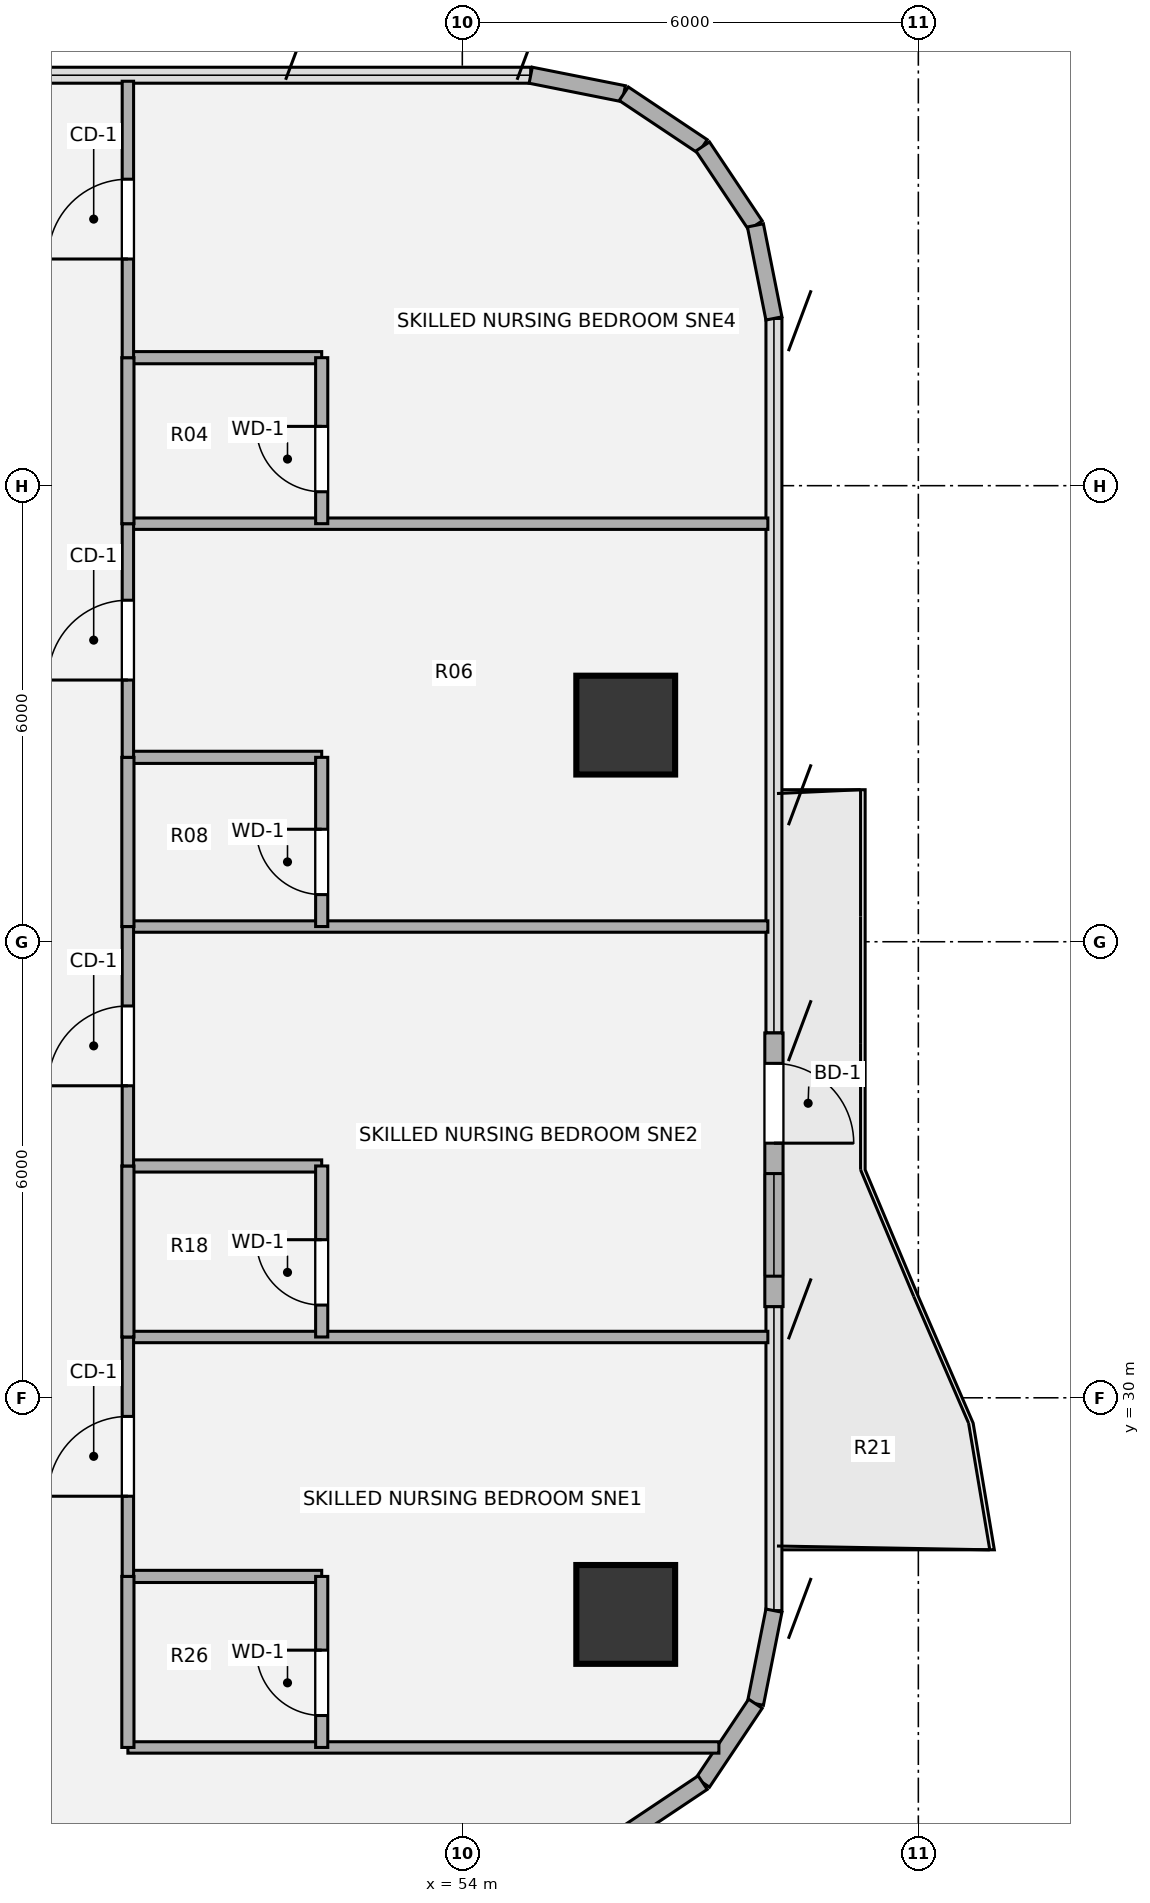
"""IFC4 building model, lengths in metres.
Left out: names, types, materials, properties, quantities, classifications, styles, units other than length and angle.
Written with IfcOpenShell. Run it as: python <this file> out.ifc"""

import sys

from ifc_helpers import new_model, si_unit, direction, frame, frame_2d, origin, origin_2d, place, context, subcontext, project, spatial, rectangle, hollow_circle, extrude, source, transform, mapped, element, fill, save


model = new_model("IFC4")
c1 = context("Model", 3, precision=1e-05, world=origin(), true_north=direction((0.0, 1.0)))
c2 = subcontext(c1, "Body", "Model", "MODEL_VIEW")
j1 = project(units=[si_unit("LENGTHUNIT", "METRE"), si_unit("PLANEANGLEUNIT", "RADIAN")], contexts=[c1])
p1 = place(None, origin())
s1 = spatial("IfcSite", under=j1, at=p1, CompositionType="ELEMENT")
p2 = place(p1, origin())
s2 = spatial("IfcBuilding", under=s1, at=p2, CompositionType="ELEMENT")
p3 = place(p2, frame((0.0, 0.0, 135.18)))
s3 = spatial("IfcBuildingStorey", under=s2, at=p3, CompositionType="ELEMENT", Elevation=135.18)
m1 = source(origin(), c2, "Body", "SweptSolid", [
    extrude(hollow_circle(Radius=0.65, WallThickness=0.045, at=origin_2d()), origin(), (0.0, 0.0, 1.0), 3.78),
])
for number, where, z_axis, x_axis in (
    (1, (56.15, 27.15, 0.0), (0.0, 0.0, 1.0), (1.0, 0.0, 0.0)),
    (2, (56.15, 38.85, 0.0), (0.0, 0.0, 1.0), (1.0, 0.0, 0.0)),
):
    element("IfcColumn", number, at=place(p3, frame(where, z_axis=z_axis, x_axis=x_axis)), inside=s3, PredefinedType="COLUMN", context=c2, shape_type="MappedRepresentation", body=[
        mapped(m1, transform((0.0, 0.0, 0.0), x_axis=(1.0, 0.0, 0.0), y_axis=(0.0, 1.0, 0.0), z_axis=(0.0, 0.0, 1.0), scale=1.0)),
    ])
for number, where, z_axis, x_axis in (
    (3, (54.9, 47.4, 0.0), (0.0, 0.0, 1.0), (0.981, -0.195, 0.0)),
    (4, (56.125, 47.156, 0.0), (0.0, 0.0, 1.0), (0.831, -0.556, 0.0)),
    (5, (57.163, 46.463, 0.0), (0.0, 0.0, 1.0), (0.556, -0.831, 0.0)),
    (6, (57.856, 45.425, 0.0), (0.0, 0.0, 1.0), (0.195, -0.981, 0.0)),
):
    element("IfcWall", number, at=place(p3, frame(where, z_axis=z_axis, x_axis=x_axis)), inside=s3, PredefinedType="SOLIDWALL", context=c2, shape_type="SweptSolid", body=[
        extrude(rectangle(XDim=1.249, YDim=0.215, at=frame_2d((0.624, 0.0))), origin(), (0.0, 0.0, 1.0), 3.53),
    ])
p4 = place(p3, frame((58.1, 34.8, 0.0), z_axis=(0.0, 0.0, 1.0), x_axis=(0.0, -1.0, 0.0)))
e7 = element("IfcWall", 7, at=p4, inside=s3, PredefinedType="SOLIDWALL", context=c2, shape_type="SweptSolid", body=[
    extrude(rectangle(XDim=3.6, YDim=0.24, at=frame_2d((1.8, 0.0))), origin(), (0.0, 0.0, 1.0), 3.53),
])
p5 = place(p4, frame((0.4, 0.0, 0.0)))
e8 = element("IfcOpeningElement", 8, at=p5, cuts=e7, PredefinedType="OPENING", context=c2, shape_type="SweptSolid", body=[
    extrude(rectangle(XDim=1.05, YDim=2.15, at=origin_2d()), frame((0.525, 0.13, 1.075), z_axis=(0.0, -1.0, 0.0), x_axis=(1.0, 0.0, 0.0)), (0.0, 0.0, 1.0), 0.26),
])
p6 = place(p4, frame((1.85, 0.0, 0.85)))
e9 = element("IfcOpeningElement", 9, at=p6, cuts=e7, PredefinedType="OPENING", context=c2, shape_type="SweptSolid", body=[
    extrude(rectangle(XDim=1.35, YDim=1.35, at=origin_2d()), frame((0.675, 0.13, 0.675), z_axis=(0.0, -1.0, 0.0), x_axis=(1.0, 0.0, 0.0)), (0.0, 0.0, 1.0), 0.26),
])
for number, where, z_axis, x_axis in (
    (10, (58.1, 27.2, 0.0), (0.0, 0.0, 1.0), (-0.195, -0.981, 0.0)),
    (11, (57.856, 25.975, 0.0), (0.0, 0.0, 1.0), (-0.556, -0.831, 0.0)),
    (12, (57.163, 24.937, 0.0), (0.0, 0.0, 1.0), (-0.831, -0.556, 0.0)),
):
    element("IfcWall", number, at=place(p3, frame(where, z_axis=z_axis, x_axis=x_axis)), inside=s3, PredefinedType="SOLIDWALL", context=c2, shape_type="SweptSolid", body=[
        extrude(rectangle(XDim=1.249, YDim=0.215, at=frame_2d((0.624, 0.0))), origin(), (0.0, 0.0, 1.0), 3.53),
    ])
p7 = place(p3, frame((49.6, 25.4, 0.0), z_axis=(0.0, 0.0, 1.0), x_axis=(1.0, 0.0, 0.0)))
e13 = element("IfcWall", 13, at=p7, inside=s3, PredefinedType="PARTITIONING", context=c2, shape_type="SweptSolid", body=[
    extrude(rectangle(XDim=7.776, YDim=0.15, at=frame_2d((3.888, 0.0))), origin(), (0.0, 0.0, 1.0), 3.5),
])
p8 = place(p3, frame((49.6, 27.65, 0.0), z_axis=(0.0, 0.0, 1.0), x_axis=(1.0, 0.0, 0.0)))
e14 = element("IfcWall", 14, at=p8, inside=s3, PredefinedType="PLUMBINGWALL", context=c2, shape_type="SweptSolid", body=[
    extrude(rectangle(XDim=2.55, YDim=0.16, at=frame_2d((1.275, 0.0))), origin(), (0.0, 0.0, 1.0), 2.982),
])
p9 = place(p3, frame((49.6, 30.8, 0.0), z_axis=(0.0, 0.0, 1.0), x_axis=(1.0, 0.0, 0.0)))
e15 = element("IfcWall", 15, at=p9, inside=s3, PredefinedType="PARTITIONING", context=c2, shape_type="SweptSolid", body=[
    extrude(rectangle(XDim=8.42, YDim=0.15, at=frame_2d((4.21, 0.0))), origin(), (0.0, 0.0, 1.0), 2.982),
])
p10 = place(p3, frame((49.6, 33.05, 0.0), z_axis=(0.0, 0.0, 1.0), x_axis=(1.0, 0.0, 0.0)))
e16 = element("IfcWall", 16, at=p10, inside=s3, PredefinedType="PLUMBINGWALL", context=c2, shape_type="SweptSolid", body=[
    extrude(rectangle(XDim=2.55, YDim=0.16, at=frame_2d((1.275, 0.0))), origin(), (0.0, 0.0, 1.0), 2.982),
])
p11 = place(p3, frame((49.6, 36.2, 0.0), z_axis=(0.0, 0.0, 1.0), x_axis=(1.0, 0.0, 0.0)))
e17 = element("IfcWall", 17, at=p11, inside=s3, PredefinedType="PARTITIONING", context=c2, shape_type="SweptSolid", body=[
    extrude(rectangle(XDim=8.42, YDim=0.15, at=frame_2d((4.21, 0.0))), origin(), (0.0, 0.0, 1.0), 2.982),
])
p12 = place(p3, frame((49.6, 38.426, 0.0), z_axis=(0.0, 0.0, 1.0), x_axis=(1.0, 0.0, 0.0)))
e18 = element("IfcWall", 18, at=p12, inside=s3, PredefinedType="PLUMBINGWALL", context=c2, shape_type="SweptSolid", body=[
    extrude(rectangle(XDim=2.55, YDim=0.16, at=frame_2d((1.275, 0.0))), origin(), (0.0, 0.0, 1.0), 3.055),
])
p13 = place(p3, frame((49.6, 41.5, 0.0), z_axis=(0.0, 0.0, 1.0), x_axis=(1.0, 0.0, 0.0)))
e19 = element("IfcWall", 19, at=p13, inside=s3, PredefinedType="PARTITIONING", context=c2, shape_type="SweptSolid", body=[
    extrude(rectangle(XDim=8.42, YDim=0.15, at=frame_2d((4.21, 0.0))), origin(), (0.0, 0.0, 1.0), 3.5),
])
p14 = place(p3, frame((49.6, 43.684, 0.0), z_axis=(0.0, 0.0, 1.0), x_axis=(1.0, 0.0, 0.0)))
e20 = element("IfcWall", 20, at=p14, inside=s3, PredefinedType="PLUMBINGWALL", context=c2, shape_type="SweptSolid", body=[
    extrude(rectangle(XDim=2.55, YDim=0.16, at=frame_2d((1.275, 0.0))), origin(), (0.0, 0.0, 1.0), 3.5),
])
p15 = place(p3, frame((49.6, 25.4, 0.0), z_axis=(0.0, 0.0, 1.0), x_axis=(0.0, 1.0, 0.0)))
e21 = element("IfcWall", 21, at=p15, inside=s3, PredefinedType="PLUMBINGWALL", context=c2, shape_type="SweptSolid", body=[
    extrude(rectangle(XDim=2.25, YDim=0.16, at=frame_2d((1.125, 0.0))), origin(), (0.0, 0.0, 1.0), 3.5),
])
p16 = place(p3, frame((49.6, 27.65, 0.0), z_axis=(0.0, 0.0, 1.0), x_axis=(0.0, 1.0, 0.0)))
e22 = element("IfcWall", 22, at=p16, inside=s3, PredefinedType="PARTITIONING", context=c2, shape_type="SweptSolid", body=[
    extrude(rectangle(XDim=3.15, YDim=0.15, at=frame_2d((1.575, 0.0))), origin(), (0.0, 0.0, 1.0), 3.5),
])
p17 = place(p16, frame((1.055, 0.0, 0.0)))
e23 = element("IfcOpeningElement", 23, at=p17, cuts=e22, PredefinedType="OPENING", context=c2, shape_type="SweptSolid", body=[
    extrude(rectangle(XDim=1.05, YDim=2.1, at=origin_2d()), frame((0.525, 0.085, 1.05), z_axis=(0.0, -1.0, 0.0), x_axis=(1.0, 0.0, 0.0)), (0.0, 0.0, 1.0), 0.17),
])
p18 = place(p3, frame((49.6, 30.8, 0.0), z_axis=(0.0, 0.0, 1.0), x_axis=(0.0, 1.0, 0.0)))
e24 = element("IfcWall", 24, at=p18, inside=s3, PredefinedType="PLUMBINGWALL", context=c2, shape_type="SweptSolid", body=[
    extrude(rectangle(XDim=2.25, YDim=0.16, at=frame_2d((1.125, 0.0))), origin(), (0.0, 0.0, 1.0), 3.5),
])
p19 = place(p3, frame((49.6, 33.05, 0.0), z_axis=(0.0, 0.0, 1.0), x_axis=(0.0, 1.0, 0.0)))
e25 = element("IfcWall", 25, at=p19, inside=s3, PredefinedType="PARTITIONING", context=c2, shape_type="SweptSolid", body=[
    extrude(rectangle(XDim=3.15, YDim=0.15, at=frame_2d((1.575, 0.0))), origin(), (0.0, 0.0, 1.0), 3.5),
])
p20 = place(p19, frame((1.055, 0.0, 0.0)))
e26 = element("IfcOpeningElement", 26, at=p20, cuts=e25, PredefinedType="OPENING", context=c2, shape_type="SweptSolid", body=[
    extrude(rectangle(XDim=1.05, YDim=2.1, at=origin_2d()), frame((0.525, 0.085, 1.05), z_axis=(0.0, -1.0, 0.0), x_axis=(1.0, 0.0, 0.0)), (0.0, 0.0, 1.0), 0.17),
])
p21 = place(p3, frame((49.6, 36.2, 0.0), z_axis=(0.0, 0.0, 1.0), x_axis=(0.0, 1.0, 0.0)))
e27 = element("IfcWall", 27, at=p21, inside=s3, PredefinedType="PLUMBINGWALL", context=c2, shape_type="SweptSolid", body=[
    extrude(rectangle(XDim=2.226, YDim=0.16, at=frame_2d((1.113, 0.0))), origin(), (0.0, 0.0, 1.0), 3.5),
])
p22 = place(p3, frame((49.6, 38.426, 0.0), z_axis=(0.0, 0.0, 1.0), x_axis=(0.0, 1.0, 0.0)))
e28 = element("IfcWall", 28, at=p22, inside=s3, PredefinedType="PARTITIONING", context=c2, shape_type="SweptSolid", body=[
    extrude(rectangle(XDim=3.074, YDim=0.15, at=frame_2d((1.537, 0.0))), origin(), (0.0, 0.0, 1.0), 3.5),
])
p23 = place(p22, frame((1.017, 0.0, 0.0)))
e29 = element("IfcOpeningElement", 29, at=p23, cuts=e28, PredefinedType="OPENING", context=c2, shape_type="SweptSolid", body=[
    extrude(rectangle(XDim=1.05, YDim=2.1, at=origin_2d()), frame((0.525, 0.085, 1.05), z_axis=(0.0, -1.0, 0.0), x_axis=(1.0, 0.0, 0.0)), (0.0, 0.0, 1.0), 0.17),
])
p24 = place(p3, frame((49.6, 41.5, 0.0), z_axis=(0.0, 0.0, 1.0), x_axis=(0.0, 1.0, 0.0)))
e30 = element("IfcWall", 30, at=p24, inside=s3, PredefinedType="PLUMBINGWALL", context=c2, shape_type="SweptSolid", body=[
    extrude(rectangle(XDim=2.184, YDim=0.16, at=frame_2d((1.092, 0.0))), origin(), (0.0, 0.0, 1.0), 3.5),
])
p25 = place(p3, frame((49.6, 43.684, 0.0), z_axis=(0.0, 0.0, 1.0), x_axis=(0.0, 1.0, 0.0)))
e31 = element("IfcWall", 31, at=p25, inside=s3, PredefinedType="PARTITIONING", context=c2, shape_type="SweptSolid", body=[
    extrude(rectangle(XDim=3.637, YDim=0.15, at=frame_2d((1.818, 0.0))), origin(), (0.0, 0.0, 1.0), 3.5),
])
p26 = place(p25, frame((1.298, 0.0, 0.0)))
e32 = element("IfcOpeningElement", 32, at=p26, cuts=e31, PredefinedType="OPENING", context=c2, shape_type="SweptSolid", body=[
    extrude(rectangle(XDim=1.05, YDim=2.1, at=origin_2d()), frame((0.525, 0.085, 1.05), z_axis=(0.0, -1.0, 0.0), x_axis=(1.0, 0.0, 0.0)), (0.0, 0.0, 1.0), 0.17),
])
p27 = place(p3, frame((52.15, 25.4, 0.0), z_axis=(0.0, 0.0, 1.0), x_axis=(0.0, 1.0, 0.0)))
e33 = element("IfcWall", 33, at=p27, inside=s3, PredefinedType="PLUMBINGWALL", context=c2, shape_type="SweptSolid", body=[
    extrude(rectangle(XDim=2.25, YDim=0.16, at=frame_2d((1.125, 0.0))), origin(), (0.0, 0.0, 1.0), 3.5),
])
p28 = place(p27, frame((0.42, 0.0, 0.0)))
e34 = element("IfcOpeningElement", 34, at=p28, cuts=e33, PredefinedType="OPENING", context=c2, shape_type="SweptSolid", body=[
    extrude(rectangle(XDim=0.86, YDim=2.1, at=origin_2d()), frame((0.43, 0.09, 1.05), z_axis=(0.0, -1.0, 0.0), x_axis=(1.0, 0.0, 0.0)), (0.0, 0.0, 1.0), 0.18),
])
p29 = place(p3, frame((52.15, 30.8, 0.0), z_axis=(0.0, 0.0, 1.0), x_axis=(0.0, 1.0, 0.0)))
e35 = element("IfcWall", 35, at=p29, inside=s3, PredefinedType="PLUMBINGWALL", context=c2, shape_type="SweptSolid", body=[
    extrude(rectangle(XDim=2.25, YDim=0.16, at=frame_2d((1.125, 0.0))), origin(), (0.0, 0.0, 1.0), 3.5),
])
p30 = place(p29, frame((0.42, 0.0, 0.0)))
e36 = element("IfcOpeningElement", 36, at=p30, cuts=e35, PredefinedType="OPENING", context=c2, shape_type="SweptSolid", body=[
    extrude(rectangle(XDim=0.86, YDim=2.1, at=origin_2d()), frame((0.43, 0.09, 1.05), z_axis=(0.0, -1.0, 0.0), x_axis=(1.0, 0.0, 0.0)), (0.0, 0.0, 1.0), 0.18),
])
p31 = place(p3, frame((52.15, 36.2, 0.0), z_axis=(0.0, 0.0, 1.0), x_axis=(0.0, 1.0, 0.0)))
e37 = element("IfcWall", 37, at=p31, inside=s3, PredefinedType="PLUMBINGWALL", context=c2, shape_type="SweptSolid", body=[
    extrude(rectangle(XDim=2.226, YDim=0.16, at=frame_2d((1.113, 0.0))), origin(), (0.0, 0.0, 1.0), 3.5),
])
p32 = place(p31, frame((0.42, 0.0, 0.0)))
e38 = element("IfcOpeningElement", 38, at=p32, cuts=e37, PredefinedType="OPENING", context=c2, shape_type="SweptSolid", body=[
    extrude(rectangle(XDim=0.86, YDim=2.1, at=origin_2d()), frame((0.43, 0.09, 1.05), z_axis=(0.0, -1.0, 0.0), x_axis=(1.0, 0.0, 0.0)), (0.0, 0.0, 1.0), 0.18),
])
p33 = place(p3, frame((52.15, 41.5, 0.0), z_axis=(0.0, 0.0, 1.0), x_axis=(0.0, 1.0, 0.0)))
e39 = element("IfcWall", 39, at=p33, inside=s3, PredefinedType="PLUMBINGWALL", context=c2, shape_type="SweptSolid", body=[
    extrude(rectangle(XDim=2.184, YDim=0.16, at=frame_2d((1.092, 0.0))), origin(), (0.0, 0.0, 1.0), 3.5),
])
p34 = place(p33, frame((0.42, 0.0, 0.0)))
e40 = element("IfcOpeningElement", 40, at=p34, cuts=e39, PredefinedType="OPENING", context=c2, shape_type="SweptSolid", body=[
    extrude(rectangle(XDim=0.86, YDim=2.1, at=origin_2d()), frame((0.43, 0.09, 1.05), z_axis=(0.0, -1.0, 0.0), x_axis=(1.0, 0.0, 0.0)), (0.0, 0.0, 1.0), 0.18),
])
m2 = source(origin(), c2, "Body", "SweptSolid", [
    extrude(rectangle(XDim=1.05, YDim=2.15, at=origin_2d()), frame((0.525, 0.025, 1.075), z_axis=(0.0, -1.0, 0.0), x_axis=(1.0, 0.0, 0.0)), (0.0, 0.0, 1.0), 0.05),
])
p35 = place(p5, origin())
e41 = element("IfcDoor", 41, at=p35, inside=s3, OperationType="SINGLE_SWING_RIGHT", PredefinedType="DOOR", context=c2, shape_type="MappedRepresentation", body=[
    mapped(m2, transform((0.0, 0.0, 0.0), x_axis=(1.0, 0.0, 0.0), y_axis=(0.0, 1.0, 0.0), z_axis=(0.0, 0.0, 1.0), scale=1.0)),
])
fill(e8, e41)
m3 = source(origin(), c2, "Body", "SweptSolid", [
    extrude(rectangle(XDim=1.35, YDim=1.35, at=origin_2d()), frame((0.675, 0.03, 0.675), z_axis=(0.0, -1.0, 0.0), x_axis=(1.0, 0.0, 0.0)), (0.0, 0.0, 1.0), 0.06),
])
p36 = place(p6, origin())
e42 = element("IfcWindow", 42, at=p36, inside=s3, PartitioningType="SINGLE_PANEL", PredefinedType="WINDOW", context=c2, shape_type="MappedRepresentation", body=[
    mapped(m3, transform((0.0, 0.0, 0.0), x_axis=(1.0, 0.0, 0.0), y_axis=(0.0, 1.0, 0.0), z_axis=(0.0, 0.0, 1.0), scale=1.0)),
])
fill(e9, e42)
m4 = source(origin(), c2, "Body", "SweptSolid", [
    extrude(rectangle(XDim=1.05, YDim=2.1, at=origin_2d()), frame((0.525, 0.025, 1.05), z_axis=(0.0, -1.0, 0.0), x_axis=(1.0, 0.0, 0.0)), (0.0, 0.0, 1.0), 0.05),
])
p37 = place(p17, origin())
e43 = element("IfcDoor", 43, at=p37, inside=s3, OperationType="SINGLE_SWING_LEFT", PredefinedType="DOOR", context=c2, shape_type="MappedRepresentation", body=[
    mapped(m4, transform((0.0, 0.0, 0.0), x_axis=(1.0, 0.0, 0.0), y_axis=(0.0, 1.0, 0.0), z_axis=(0.0, 0.0, 1.0), scale=1.0)),
])
fill(e23, e43)
p38 = place(p20, origin())
e44 = element("IfcDoor", 44, at=p38, inside=s3, OperationType="SINGLE_SWING_LEFT", PredefinedType="DOOR", context=c2, shape_type="MappedRepresentation", body=[
    mapped(m4, transform((0.0, 0.0, 0.0), x_axis=(1.0, 0.0, 0.0), y_axis=(0.0, 1.0, 0.0), z_axis=(0.0, 0.0, 1.0), scale=1.0)),
])
fill(e26, e44)
p39 = place(p23, origin())
e45 = element("IfcDoor", 45, at=p39, inside=s3, OperationType="SINGLE_SWING_LEFT", PredefinedType="DOOR", context=c2, shape_type="MappedRepresentation", body=[
    mapped(m4, transform((0.0, 0.0, 0.0), x_axis=(1.0, 0.0, 0.0), y_axis=(0.0, 1.0, 0.0), z_axis=(0.0, 0.0, 1.0), scale=1.0)),
])
fill(e29, e45)
p40 = place(p26, origin())
e46 = element("IfcDoor", 46, at=p40, inside=s3, OperationType="SINGLE_SWING_LEFT", PredefinedType="DOOR", context=c2, shape_type="MappedRepresentation", body=[
    mapped(m4, transform((0.0, 0.0, 0.0), x_axis=(1.0, 0.0, 0.0), y_axis=(0.0, 1.0, 0.0), z_axis=(0.0, 0.0, 1.0), scale=1.0)),
])
fill(e32, e46)
m5 = source(origin(), c2, "Body", "SweptSolid", [
    extrude(rectangle(XDim=0.86, YDim=2.1, at=origin_2d()), frame((0.43, 0.025, 1.05), z_axis=(0.0, -1.0, 0.0), x_axis=(1.0, 0.0, 0.0)), (0.0, 0.0, 1.0), 0.05),
])
p41 = place(p28, origin())
e47 = element("IfcDoor", 47, at=p41, inside=s3, OperationType="SINGLE_SWING_RIGHT", PredefinedType="DOOR", context=c2, shape_type="MappedRepresentation", body=[
    mapped(m5, transform((0.0, 0.0, 0.0), x_axis=(1.0, 0.0, 0.0), y_axis=(0.0, 1.0, 0.0), z_axis=(0.0, 0.0, 1.0), scale=1.0)),
])
fill(e34, e47)
p42 = place(p30, origin())
e48 = element("IfcDoor", 48, at=p42, inside=s3, OperationType="SINGLE_SWING_RIGHT", PredefinedType="DOOR", context=c2, shape_type="MappedRepresentation", body=[
    mapped(m5, transform((0.0, 0.0, 0.0), x_axis=(1.0, 0.0, 0.0), y_axis=(0.0, 1.0, 0.0), z_axis=(0.0, 0.0, 1.0), scale=1.0)),
])
fill(e36, e48)
p43 = place(p32, origin())
e49 = element("IfcDoor", 49, at=p43, inside=s3, OperationType="SINGLE_SWING_RIGHT", PredefinedType="DOOR", context=c2, shape_type="MappedRepresentation", body=[
    mapped(m5, transform((0.0, 0.0, 0.0), x_axis=(1.0, 0.0, 0.0), y_axis=(0.0, 1.0, 0.0), z_axis=(0.0, 0.0, 1.0), scale=1.0)),
])
fill(e38, e49)
p44 = place(p34, origin())
e50 = element("IfcDoor", 50, at=p44, inside=s3, OperationType="SINGLE_SWING_RIGHT", PredefinedType="DOOR", context=c2, shape_type="MappedRepresentation", body=[
    mapped(m5, transform((0.0, 0.0, 0.0), x_axis=(1.0, 0.0, 0.0), y_axis=(0.0, 1.0, 0.0), z_axis=(0.0, 0.0, 1.0), scale=1.0)),
])
fill(e40, e50)
save(model, sys.argv[1])
